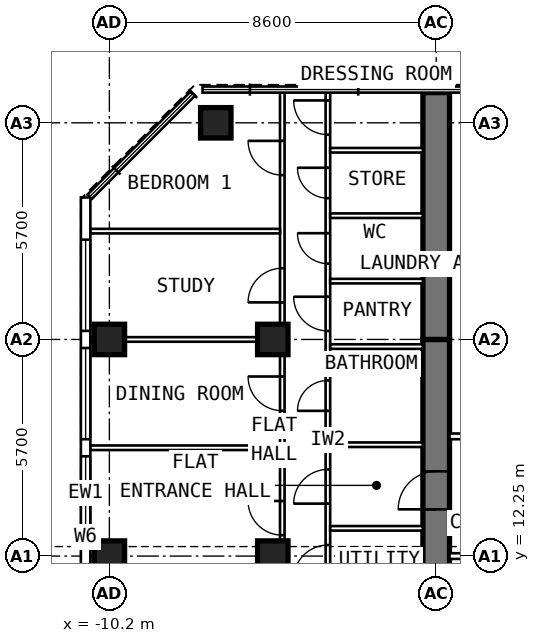
"""IFC4 building model, lengths in metres.
Left out: names, types, materials, properties, quantities, classifications, styles, units other than length and angle.
Written with IfcOpenShell. Run it as: python <this file> out.ifc"""

import sys

from ifc_helpers import new_model, si_unit, direction, frame, frame_2d, origin, origin_2d, place, context, subcontext, project, spatial, rectangle, extrude, element, fill, save


model = new_model("IFC4")
c1 = context("Model", 3, precision=1e-05, world=origin(), true_north=direction((0.0, 1.0)))
c2 = subcontext(c1, "Body", "Model", "MODEL_VIEW")
j1 = project(units=[si_unit("LENGTHUNIT", "METRE"), si_unit("PLANEANGLEUNIT", "RADIAN")], contexts=[c1])
p1 = place(None, origin())
s1 = spatial("IfcSite", under=j1, at=p1, CompositionType="ELEMENT")
p2 = place(p1, origin())
s2 = spatial("IfcBuilding", under=s1, at=p2, CompositionType="ELEMENT")
p3 = place(p2, frame((0.0, 0.0, 285.4)))
s3 = spatial("IfcBuildingStorey", under=s2, at=p3, CompositionType="ELEMENT", Elevation=285.4)
for number, where, z_axis, x_axis in (
    (1, (-10.2, 12.25, 0.0), (0.0, 0.0, 1.0), (0.0, 1.0, 0.0)),
    (2, (-10.2, 17.95, 0.0), (0.0, 0.0, 1.0), (0.0, 1.0, 0.0)),
    (3, (-7.4, 23.65, 0.0), (0.0, 0.0, 1.0), (0.0, 1.0, 0.0)),
    (4, (-5.9, 12.25, 0.0), (0.0, 0.0, 1.0), (0.0, 1.0, 0.0)),
    (5, (-5.9, 17.95, 0.0), (0.0, 0.0, 1.0), (0.0, 1.0, 0.0)),
):
    element("IfcColumn", number, at=place(p3, frame(where, z_axis=z_axis, x_axis=x_axis)), inside=s3, PredefinedType="COLUMN", context=c2, shape_type="SweptSolid", body=[
        extrude(rectangle(XDim=0.8, YDim=0.8, at=origin_2d()), origin(), (0.0, 0.0, 1.0), 3.6),
    ])
p4 = place(p3, frame((-1.6, 9.6, 0.0), z_axis=(0.0, 0.0, 1.0), x_axis=(0.0, 1.0, 0.0)))
e6 = element("IfcWall", 6, at=p4, inside=s3, PredefinedType="SHEAR", context=c2, shape_type="SweptSolid", body=[
    extrude(rectangle(XDim=8.35, YDim=0.7, at=frame_2d((4.175, 0.0))), origin(), (0.0, 0.0, 1.0), 3.6),
])
p5 = place(p4, frame((3.88, 0.0, 0.0)))
e7 = element("IfcOpeningElement", 7, at=p5, cuts=e6, PredefinedType="OPENING", context=c2, shape_type="SweptSolid", body=[
    extrude(rectangle(XDim=1.0, YDim=2.1, at=frame_2d((0.5, 1.05))), frame((0.0, 0.362, 0.0), z_axis=(0.0, -1.0, 0.0), x_axis=(1.0, 0.0, 0.0)), (0.0, 0.0, 1.0), 0.724),
])
p6 = place(p3, frame((-1.6, 17.95, 0.0), z_axis=(0.0, 0.0, 1.0), x_axis=(0.0, 1.0, 0.0)))
e8 = element("IfcWall", 8, at=p6, inside=s3, PredefinedType="SHEAR", context=c2, shape_type="SweptSolid", body=[
    extrude(rectangle(XDim=6.495, YDim=0.7, at=frame_2d((3.248, 0.0))), origin(), (0.0, 0.0, 1.0), 3.6),
])
p7 = place(p3, frame((-10.825, 6.148, 0.0), z_axis=(0.0, 0.0, 1.0), x_axis=(0.0, 1.0, 0.0)))
e9 = element("IfcWall", 9, at=p7, inside=s3, PredefinedType="SOLIDWALL", context=c2, shape_type="SweptSolid", body=[
    extrude(rectangle(XDim=15.537, YDim=0.25, at=frame_2d((7.769, 0.0))), origin(), (0.0, 0.0, 1.0), 3.35),
])
p8 = place(p7, frame((0.627, 0.0, 0.6)))
e10 = element("IfcOpeningElement", 10, at=p8, cuts=e9, PredefinedType="OPENING", context=c2, shape_type="SweptSolid", body=[
    extrude(rectangle(XDim=2.4, YDim=2.0, at=frame_2d((1.2, 1.0))), frame((0.0, 0.137, 0.0), z_axis=(0.0, -1.0, 0.0), x_axis=(1.0, 0.0, 0.0)), (0.0, 0.0, 1.0), 0.274),
])
p9 = place(p7, frame((3.477, 0.0, 0.6)))
e11 = element("IfcOpeningElement", 11, at=p9, cuts=e9, PredefinedType="OPENING", context=c2, shape_type="SweptSolid", body=[
    extrude(rectangle(XDim=2.4, YDim=2.0, at=frame_2d((1.2, 1.0))), frame((0.0, 0.137, 0.0), z_axis=(0.0, -1.0, 0.0), x_axis=(1.0, 0.0, 0.0)), (0.0, 0.0, 1.0), 0.274),
])
p10 = place(p7, frame((6.327, 0.0, 0.6)))
e12 = element("IfcOpeningElement", 12, at=p10, cuts=e9, PredefinedType="OPENING", context=c2, shape_type="SweptSolid", body=[
    extrude(rectangle(XDim=2.4, YDim=2.0, at=frame_2d((1.2, 1.0))), frame((0.0, 0.137, 0.0), z_axis=(0.0, -1.0, 0.0), x_axis=(1.0, 0.0, 0.0)), (0.0, 0.0, 1.0), 0.274),
])
p11 = place(p7, frame((9.177, 0.0, 0.6)))
e13 = element("IfcOpeningElement", 13, at=p11, cuts=e9, PredefinedType="OPENING", context=c2, shape_type="SweptSolid", body=[
    extrude(rectangle(XDim=2.4, YDim=2.0, at=frame_2d((1.2, 1.0))), frame((0.0, 0.137, 0.0), z_axis=(0.0, -1.0, 0.0), x_axis=(1.0, 0.0, 0.0)), (0.0, 0.0, 1.0), 0.274),
])
p12 = place(p7, frame((12.027, 0.0, 0.6)))
e14 = element("IfcOpeningElement", 14, at=p12, cuts=e9, PredefinedType="OPENING", context=c2, shape_type="SweptSolid", body=[
    extrude(rectangle(XDim=2.4, YDim=2.0, at=frame_2d((1.2, 1.0))), frame((0.0, 0.137, 0.0), z_axis=(0.0, -1.0, 0.0), x_axis=(1.0, 0.0, 0.0)), (0.0, 0.0, 1.0), 0.274),
])
p13 = place(p3, frame((-4.45, 9.85, 0.0), z_axis=(0.0, 0.0, 1.0), x_axis=(0.0, 1.0, 0.0)))
e15 = element("IfcWall", 15, at=p13, inside=s3, PredefinedType="PARTITIONING", context=c2, shape_type="SweptSolid", body=[
    extrude(rectangle(XDim=14.595, YDim=0.12, at=frame_2d((7.297, 0.0))), origin(), (0.0, 0.0, 1.0), 3.35),
])
p14 = place(p13, frame((1.79, 0.0, 0.0)))
e16 = element("IfcOpeningElement", 16, at=p14, cuts=e15, PredefinedType="OPENING", context=c2, shape_type="SweptSolid", body=[
    extrude(rectangle(XDim=0.9, YDim=2.1, at=frame_2d((0.45, 1.05))), frame((0.0, 0.072, 0.0), z_axis=(0.0, -1.0, 0.0), x_axis=(1.0, 0.0, 0.0)), (0.0, 0.0, 1.0), 0.144),
])
p15 = place(p13, frame((3.78, 0.0, 0.0)))
e17 = element("IfcOpeningElement", 17, at=p15, cuts=e15, PredefinedType="OPENING", context=c2, shape_type="SweptSolid", body=[
    extrude(rectangle(XDim=0.9, YDim=2.1, at=frame_2d((0.45, 1.05))), frame((0.0, 0.072, 0.0), z_axis=(0.0, -1.0, 0.0), x_axis=(1.0, 0.0, 0.0)), (0.0, 0.0, 1.0), 0.144),
])
p16 = place(p13, frame((6.221, 0.0, 0.0)))
e18 = element("IfcOpeningElement", 18, at=p16, cuts=e15, PredefinedType="OPENING", context=c2, shape_type="SweptSolid", body=[
    extrude(rectangle(XDim=0.8, YDim=2.1, at=frame_2d((0.4, 1.05))), frame((0.0, 0.072, 0.0), z_axis=(0.0, -1.0, 0.0), x_axis=(1.0, 0.0, 0.0)), (0.0, 0.0, 1.0), 0.144),
])
p17 = place(p13, frame((8.324, 0.0, 0.0)))
e19 = element("IfcOpeningElement", 19, at=p17, cuts=e15, PredefinedType="OPENING", context=c2, shape_type="SweptSolid", body=[
    extrude(rectangle(XDim=0.9, YDim=2.1, at=frame_2d((0.45, 1.05))), frame((0.0, 0.072, 0.0), z_axis=(0.0, -1.0, 0.0), x_axis=(1.0, 0.0, 0.0)), (0.0, 0.0, 1.0), 0.144),
])
p18 = place(p13, frame((10.095, 0.0, 0.0)))
e20 = element("IfcOpeningElement", 20, at=p18, cuts=e15, PredefinedType="OPENING", context=c2, shape_type="SweptSolid", body=[
    extrude(rectangle(XDim=0.8, YDim=2.1, at=frame_2d((0.4, 1.05))), frame((0.0, 0.072, 0.0), z_axis=(0.0, -1.0, 0.0), x_axis=(1.0, 0.0, 0.0)), (0.0, 0.0, 1.0), 0.144),
])
p19 = place(p13, frame((11.817, 0.0, 0.0)))
e21 = element("IfcOpeningElement", 21, at=p19, cuts=e15, PredefinedType="OPENING", context=c2, shape_type="SweptSolid", body=[
    extrude(rectangle(XDim=0.8, YDim=2.1, at=frame_2d((0.4, 1.05))), frame((0.0, 0.072, 0.0), z_axis=(0.0, -1.0, 0.0), x_axis=(1.0, 0.0, 0.0)), (0.0, 0.0, 1.0), 0.144),
])
p20 = place(p13, frame((13.489, 0.0, 0.0)))
e22 = element("IfcOpeningElement", 22, at=p20, cuts=e15, PredefinedType="OPENING", context=c2, shape_type="SweptSolid", body=[
    extrude(rectangle(XDim=0.9, YDim=2.1, at=frame_2d((0.45, 1.05))), frame((0.0, 0.072, 0.0), z_axis=(0.0, -1.0, 0.0), x_axis=(1.0, 0.0, 0.0)), (0.0, 0.0, 1.0), 0.144),
])
p21 = place(p3, frame((-5.65, 9.6, 0.0), z_axis=(0.0, 0.0, 1.0), x_axis=(0.0, 1.0, 0.0)))
e23 = element("IfcWall", 23, at=p21, inside=s3, PredefinedType="PARTITIONING", context=c2, shape_type="SweptSolid", body=[
    extrude(rectangle(XDim=14.845, YDim=0.12, at=frame_2d((7.422, 0.0))), origin(), (0.0, 0.0, 1.0), 3.35),
])
p22 = place(p21, frame((3.2, 0.0, 0.0)))
e24 = element("IfcOpeningElement", 24, at=p22, cuts=e23, PredefinedType="OPENING", context=c2, shape_type="SweptSolid", body=[
    extrude(rectangle(XDim=0.9, YDim=2.1, at=frame_2d((0.45, 1.05))), frame((0.0, 0.072, 0.0), z_axis=(0.0, -1.0, 0.0), x_axis=(1.0, 0.0, 0.0)), (0.0, 0.0, 1.0), 0.144),
])
p23 = place(p21, frame((6.475, 0.0, 0.0)))
e25 = element("IfcOpeningElement", 25, at=p23, cuts=e23, PredefinedType="OPENING", context=c2, shape_type="SweptSolid", body=[
    extrude(rectangle(XDim=0.9, YDim=2.1, at=frame_2d((0.45, 1.05))), frame((0.0, 0.072, 0.0), z_axis=(0.0, -1.0, 0.0), x_axis=(1.0, 0.0, 0.0)), (0.0, 0.0, 1.0), 0.144),
])
p24 = place(p21, frame((9.325, 0.0, 0.0)))
e26 = element("IfcOpeningElement", 26, at=p24, cuts=e23, PredefinedType="OPENING", context=c2, shape_type="SweptSolid", body=[
    extrude(rectangle(XDim=0.9, YDim=2.1, at=frame_2d((0.45, 1.05))), frame((0.0, 0.072, 0.0), z_axis=(0.0, -1.0, 0.0), x_axis=(1.0, 0.0, 0.0)), (0.0, 0.0, 1.0), 0.144),
])
p25 = place(p21, frame((12.675, 0.0, 0.0)))
e27 = element("IfcOpeningElement", 27, at=p25, cuts=e23, PredefinedType="OPENING", context=c2, shape_type="SweptSolid", body=[
    extrude(rectangle(XDim=0.9, YDim=2.1, at=frame_2d((0.45, 1.05))), frame((0.0, 0.072, 0.0), z_axis=(0.0, -1.0, 0.0), x_axis=(1.0, 0.0, 0.0)), (0.0, 0.0, 1.0), 0.144),
])
p26 = place(p3, frame((-5.71, 15.1, 0.0), z_axis=(0.0, 0.0, 1.0), x_axis=(-1.0, 0.0, 0.0)))
e28 = element("IfcWall", 28, at=p26, inside=s3, PredefinedType="PARTITIONING", context=c2, shape_type="SweptSolid", body=[
    extrude(rectangle(XDim=4.99, YDim=0.12, at=frame_2d((2.495, 0.0))), origin(), (0.0, 0.0, 1.0), 3.35),
])
p27 = place(p3, frame((-5.71, 17.95, 0.0), z_axis=(0.0, 0.0, 1.0), x_axis=(-1.0, 0.0, 0.0)))
e29 = element("IfcWall", 29, at=p27, inside=s3, PredefinedType="PARTITIONING", context=c2, shape_type="SweptSolid", body=[
    extrude(rectangle(XDim=4.99, YDim=0.12, at=frame_2d((2.495, 0.0))), origin(), (0.0, 0.0, 1.0), 2.45),
])
p28 = place(p3, frame((-5.71, 20.8, 0.0), z_axis=(0.0, 0.0, 1.0), x_axis=(-1.0, 0.0, 0.0)))
e30 = element("IfcWall", 30, at=p28, inside=s3, PredefinedType="PARTITIONING", context=c2, shape_type="SweptSolid", body=[
    extrude(rectangle(XDim=4.99, YDim=0.12, at=frame_2d((2.495, 0.0))), origin(), (0.0, 0.0, 1.0), 3.35),
])
for number, where, z_axis, x_axis in (
    (31, (-1.95, 12.98, 0.0), (0.0, 0.0, 1.0), (-1.0, 0.0, 0.0)),
    (32, (-1.95, 15.18, 0.0), (0.0, 0.0, 1.0), (-1.0, 0.0, 0.0)),
):
    element("IfcWall", number, at=place(p3, frame(where, z_axis=z_axis, x_axis=x_axis)), inside=s3, PredefinedType="PARTITIONING", context=c2, shape_type="SweptSolid", body=[
        extrude(rectangle(XDim=2.44, YDim=0.12, at=frame_2d((1.22, 0.0))), origin(), (0.0, 0.0, 1.0), 3.35),
    ])
p29 = place(p3, frame((-1.95, 17.763, 0.0), z_axis=(0.0, 0.0, 1.0), x_axis=(-1.0, 0.0, 0.0)))
e33 = element("IfcWall", 33, at=p29, inside=s3, PredefinedType="PARTITIONING", context=c2, shape_type="SweptSolid", body=[
    extrude(rectangle(XDim=2.44, YDim=0.12, at=frame_2d((1.22, 0.0))), origin(), (0.0, 0.0, 1.0), 2.45),
])
for number, where, z_axis, x_axis in (
    (34, (-1.95, 19.485, 0.0), (0.0, 0.0, 1.0), (-1.0, 0.0, 0.0)),
    (35, (-1.95, 21.206, 0.0), (0.0, 0.0, 1.0), (-1.0, 0.0, 0.0)),
    (36, (-1.95, 22.928, 0.0), (0.0, 0.0, 1.0), (-1.0, 0.0, 0.0)),
):
    element("IfcWall", number, at=place(p3, frame(where, z_axis=z_axis, x_axis=x_axis)), inside=s3, PredefinedType="PARTITIONING", context=c2, shape_type="SweptSolid", body=[
        extrude(rectangle(XDim=2.44, YDim=0.12, at=frame_2d((1.22, 0.0))), origin(), (0.0, 0.0, 1.0), 3.35),
    ])
p30 = place(p3, frame((1.25, 15.4, 0.0), z_axis=(0.0, 0.0, 1.0), x_axis=(-1.0, 0.0, 0.0)))
e37 = element("IfcWall", 37, at=p30, inside=s3, PredefinedType="PARTITIONING", context=c2, shape_type="SweptSolid", body=[
    extrude(rectangle(XDim=2.5, YDim=0.15, at=frame_2d((1.25, 0.0))), origin(), (0.0, 0.0, 1.0), 3.35),
])
p31 = place(p30, frame((0.75, 0.0, 0.0)))
e38 = element("IfcOpeningElement", 38, at=p31, cuts=e37, PredefinedType="OPENING", context=c2, shape_type="SweptSolid", body=[
    extrude(rectangle(XDim=1.0, YDim=2.1, at=frame_2d((0.5, 1.05))), frame((0.0, 0.087, 0.0), z_axis=(0.0, -1.0, 0.0), x_axis=(1.0, 0.0, 0.0)), (0.0, 0.0, 1.0), 0.174),
])
p32 = place(p3, frame((1.25, 12.25, 0.0), z_axis=(0.0, 0.0, 1.0), x_axis=(-1.0, 0.0, 0.0)))
e39 = element("IfcWall", 39, at=p32, inside=s3, PredefinedType="PARTITIONING", context=c2, shape_type="SweptSolid", body=[
    extrude(rectangle(XDim=2.5, YDim=0.15, at=frame_2d((1.25, 0.0))), origin(), (0.0, 0.0, 1.0), 3.35),
])
p33 = place(p32, frame((0.75, 0.0, 0.0)))
e40 = element("IfcOpeningElement", 40, at=p33, cuts=e39, PredefinedType="OPENING", context=c2, shape_type="SweptSolid", body=[
    extrude(rectangle(XDim=1.0, YDim=2.1, at=frame_2d((0.5, 1.05))), frame((0.0, 0.087, 0.0), z_axis=(0.0, -1.0, 0.0), x_axis=(1.0, 0.0, 0.0)), (0.0, 0.0, 1.0), 0.174),
])
p34 = place(p10, origin())
e41 = element("IfcWindow", 41, at=p34, inside=s3, PartitioningType="SINGLE_PANEL", PredefinedType="WINDOW", context=c2, shape_type="SweptSolid", body=[
    extrude(rectangle(XDim=2.4, YDim=2.0, at=frame_2d((1.2, 1.0))), frame((0.0, 0.03, 0.0), z_axis=(0.0, -1.0, 0.0), x_axis=(1.0, 0.0, 0.0)), (0.0, 0.0, 1.0), 0.06),
])
fill(e12, e41)
p35 = place(p11, origin())
e42 = element("IfcWindow", 42, at=p35, inside=s3, PartitioningType="SINGLE_PANEL", PredefinedType="WINDOW", context=c2, shape_type="SweptSolid", body=[
    extrude(rectangle(XDim=2.4, YDim=2.0, at=frame_2d((1.2, 1.0))), frame((0.0, 0.03, 0.0), z_axis=(0.0, -1.0, 0.0), x_axis=(1.0, 0.0, 0.0)), (0.0, 0.0, 1.0), 0.06),
])
fill(e13, e42)
p36 = place(p12, origin())
e43 = element("IfcWindow", 43, at=p36, inside=s3, PartitioningType="SINGLE_PANEL", PredefinedType="WINDOW", context=c2, shape_type="SweptSolid", body=[
    extrude(rectangle(XDim=2.4, YDim=2.0, at=frame_2d((1.2, 1.0))), frame((0.0, 0.03, 0.0), z_axis=(0.0, -1.0, 0.0), x_axis=(1.0, 0.0, 0.0)), (0.0, 0.0, 1.0), 0.06),
])
fill(e14, e43)
p37 = place(p5, origin())
e44 = element("IfcDoor", 44, at=p37, inside=s3, OperationType="SINGLE_SWING_LEFT", PredefinedType="DOOR", context=c2, shape_type="SweptSolid", body=[
    extrude(rectangle(XDim=1.0, YDim=2.1, at=frame_2d((0.5, 1.05))), frame((0.0, 0.1, 0.0), z_axis=(0.0, -1.0, 0.0), x_axis=(1.0, 0.0, 0.0)), (0.0, 0.0, 1.0), 0.2),
])
fill(e7, e44)
p38 = place(p22, origin())
e45 = element("IfcDoor", 45, at=p38, inside=s3, OperationType="SINGLE_SWING_RIGHT", PredefinedType="DOOR", context=c2, shape_type="SweptSolid", body=[
    extrude(rectangle(XDim=0.9, YDim=2.1, at=frame_2d((0.45, 1.05))), frame((0.0, 0.025, 0.0), z_axis=(0.0, -1.0, 0.0), x_axis=(1.0, 0.0, 0.0)), (0.0, 0.0, 1.0), 0.05),
])
fill(e24, e45)
p39 = place(p23, origin())
e46 = element("IfcDoor", 46, at=p39, inside=s3, OperationType="SINGLE_SWING_RIGHT", PredefinedType="DOOR", context=c2, shape_type="SweptSolid", body=[
    extrude(rectangle(XDim=0.9, YDim=2.1, at=frame_2d((0.45, 1.05))), frame((0.0, 0.025, 0.0), z_axis=(0.0, -1.0, 0.0), x_axis=(1.0, 0.0, 0.0)), (0.0, 0.0, 1.0), 0.05),
])
fill(e25, e46)
p40 = place(p24, origin())
e47 = element("IfcDoor", 47, at=p40, inside=s3, OperationType="SINGLE_SWING_LEFT", PredefinedType="DOOR", context=c2, shape_type="SweptSolid", body=[
    extrude(rectangle(XDim=0.9, YDim=2.1, at=frame_2d((0.45, 1.05))), frame((0.0, 0.025, 0.0), z_axis=(0.0, -1.0, 0.0), x_axis=(1.0, 0.0, 0.0)), (0.0, 0.0, 1.0), 0.05),
])
fill(e26, e47)
p41 = place(p25, origin())
e48 = element("IfcDoor", 48, at=p41, inside=s3, OperationType="SINGLE_SWING_RIGHT", PredefinedType="DOOR", context=c2, shape_type="SweptSolid", body=[
    extrude(rectangle(XDim=0.9, YDim=2.1, at=frame_2d((0.45, 1.05))), frame((0.0, 0.025, 0.0), z_axis=(0.0, -1.0, 0.0), x_axis=(1.0, 0.0, 0.0)), (0.0, 0.0, 1.0), 0.05),
])
fill(e27, e48)
p42 = place(p14, origin())
e49 = element("IfcDoor", 49, at=p42, inside=s3, OperationType="SINGLE_SWING_LEFT", PredefinedType="DOOR", context=c2, shape_type="SweptSolid", body=[
    extrude(rectangle(XDim=0.9, YDim=2.1, at=frame_2d((0.45, 1.05))), frame((0.0, 0.025, 0.0), z_axis=(0.0, -1.0, 0.0), x_axis=(1.0, 0.0, 0.0)), (0.0, 0.0, 1.0), 0.05),
])
fill(e16, e49)
p43 = place(p15, origin())
e50 = element("IfcDoor", 50, at=p43, inside=s3, OperationType="SINGLE_SWING_LEFT", PredefinedType="DOOR", context=c2, shape_type="SweptSolid", body=[
    extrude(rectangle(XDim=0.9, YDim=2.1, at=frame_2d((0.45, 1.05))), frame((0.0, 0.025, 0.0), z_axis=(0.0, -1.0, 0.0), x_axis=(1.0, 0.0, 0.0)), (0.0, 0.0, 1.0), 0.05),
])
fill(e17, e50)
p44 = place(p16, origin())
e51 = element("IfcDoor", 51, at=p44, inside=s3, OperationType="SINGLE_SWING_LEFT", PredefinedType="DOOR", context=c2, shape_type="SweptSolid", body=[
    extrude(rectangle(XDim=0.8, YDim=2.1, at=frame_2d((0.4, 1.05))), frame((0.0, 0.025, 0.0), z_axis=(0.0, -1.0, 0.0), x_axis=(1.0, 0.0, 0.0)), (0.0, 0.0, 1.0), 0.05),
])
fill(e18, e51)
p45 = place(p17, origin())
e52 = element("IfcDoor", 52, at=p45, inside=s3, OperationType="SINGLE_SWING_RIGHT", PredefinedType="DOOR", context=c2, shape_type="SweptSolid", body=[
    extrude(rectangle(XDim=0.9, YDim=2.1, at=frame_2d((0.45, 1.05))), frame((0.0, 0.025, 0.0), z_axis=(0.0, -1.0, 0.0), x_axis=(1.0, 0.0, 0.0)), (0.0, 0.0, 1.0), 0.05),
])
fill(e19, e52)
p46 = place(p18, origin())
e53 = element("IfcDoor", 53, at=p46, inside=s3, OperationType="SINGLE_SWING_RIGHT", PredefinedType="DOOR", context=c2, shape_type="SweptSolid", body=[
    extrude(rectangle(XDim=0.8, YDim=2.1, at=frame_2d((0.4, 1.05))), frame((0.0, 0.025, 0.0), z_axis=(0.0, -1.0, 0.0), x_axis=(1.0, 0.0, 0.0)), (0.0, 0.0, 1.0), 0.05),
])
fill(e20, e53)
p47 = place(p19, origin())
e54 = element("IfcDoor", 54, at=p47, inside=s3, OperationType="SINGLE_SWING_RIGHT", PredefinedType="DOOR", context=c2, shape_type="SweptSolid", body=[
    extrude(rectangle(XDim=0.8, YDim=2.1, at=frame_2d((0.4, 1.05))), frame((0.0, 0.025, 0.0), z_axis=(0.0, -1.0, 0.0), x_axis=(1.0, 0.0, 0.0)), (0.0, 0.0, 1.0), 0.05),
])
fill(e21, e54)
p48 = place(p20, origin())
e55 = element("IfcDoor", 55, at=p48, inside=s3, OperationType="SINGLE_SWING_RIGHT", PredefinedType="DOOR", context=c2, shape_type="SweptSolid", body=[
    extrude(rectangle(XDim=0.9, YDim=2.1, at=frame_2d((0.45, 1.05))), frame((0.0, 0.025, 0.0), z_axis=(0.0, -1.0, 0.0), x_axis=(1.0, 0.0, 0.0)), (0.0, 0.0, 1.0), 0.05),
])
fill(e22, e55)
save(model, sys.argv[1])
